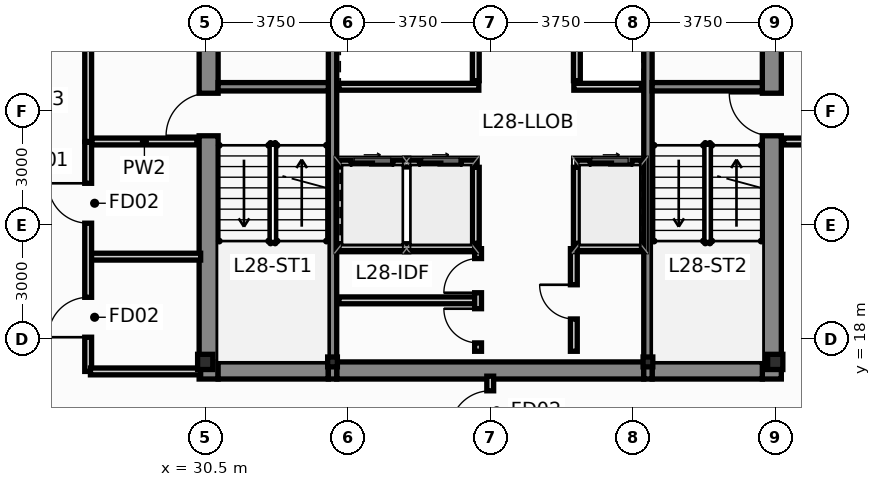
"""IFC4 building model, lengths in metres.
Left out: names, types, materials, properties, quantities, classifications, styles, units other than length and angle.
Written with IfcOpenShell. Run it as: python <this file> out.ifc"""

import sys

from ifc_helpers import new_model, si_unit, direction, frame, frame_2d, origin, origin_2d, place, context, subcontext, project, spatial, rectangle, i_section, extrude, source, transform, mapped, element, fill, save


model = new_model("IFC4")
c1 = context("Model", 3, precision=1e-05, world=origin(), true_north=direction((0.0, 1.0)))
c2 = subcontext(c1, "Body", "Model", "MODEL_VIEW")
j1 = project(units=[si_unit("LENGTHUNIT", "METRE"), si_unit("PLANEANGLEUNIT", "RADIAN")], contexts=[c1])
p1 = place(None, origin())
s1 = spatial("IfcSite", under=j1, at=p1, CompositionType="ELEMENT")
p2 = place(p1, origin())
s2 = spatial("IfcBuilding", under=s1, at=p2, CompositionType="ELEMENT")
p3 = place(p2, frame((0.0, 0.0, 109.05)))
s3 = spatial("IfcBuildingStorey", under=s2, at=p3, CompositionType="ELEMENT", Elevation=109.05)
m1 = source(origin(), c2, "Body", "SweptSolid", [
    extrude(i_section(OverallWidth=0.4, OverallDepth=0.4, WebThickness=0.02, FlangeThickness=0.032, at=origin_2d()), origin(), (0.0, 0.0, 1.0), 3.65),
])
for number, where, z_axis, x_axis in (
    (1, (30.5, 17.4, 0.0), (0.0, 0.0, 1.0), (1.0, 0.0, 0.0)),
    (2, (45.5, 17.4, 0.0), (0.0, 0.0, 1.0), (1.0, 0.0, 0.0)),
):
    element("IfcColumn", number, at=place(p3, frame(where, z_axis=z_axis, x_axis=x_axis)), inside=s3, PredefinedType="COLUMN", context=c2, shape_type="MappedRepresentation", body=[
        mapped(m1, transform((0.0, 0.0, 0.0), scale=1.0)),
    ])
m2 = source(origin(), c2, "Body", "SweptSolid", [
    extrude(i_section(OverallWidth=0.256, OverallDepth=0.26, WebThickness=0.01, FlangeThickness=0.017, at=origin_2d()), origin(), (0.0, 0.0, 1.0), 3.65),
])
for number, where, z_axis, x_axis in (
    (3, (33.85, 17.4, 0.0), (0.0, 0.0, 1.0), (1.0, 0.0, 0.0)),
    (4, (42.15, 17.4, 0.0), (0.0, 0.0, 1.0), (1.0, 0.0, 0.0)),
):
    element("IfcColumn", number, at=place(p3, frame(where, z_axis=z_axis, x_axis=x_axis)), inside=s3, PredefinedType="COLUMN", context=c2, shape_type="MappedRepresentation", body=[
        mapped(m2, transform((0.0, 0.0, 0.0), scale=1.0)),
    ])
p4 = place(p3, frame((30.59, 16.95, 0.0), z_axis=(0.0, 0.0, 1.0), x_axis=(0.0, 1.0, 0.0)))
e5 = element("IfcWall", 5, at=p4, inside=s3, PredefinedType="SHEAR", context=c2, shape_type="SweptSolid", body=[
    extrude(rectangle(XDim=13.275, YDim=0.5, at=frame_2d((6.638, 0.0))), origin(), (0.0, 0.0, 1.0), 3.65),
])
p5 = place(p4, frame((6.4, 0.0, 0.0)))
e6 = element("IfcOpeningElement", 6, at=p5, cuts=e5, PredefinedType="OPENING", context=c2, shape_type="SweptSolid", body=[
    extrude(rectangle(XDim=1.12, YDim=2.15, at=frame_2d((0.56, 1.075))), frame((0.0, 0.262, 0.0), z_axis=(0.0, -1.0, 0.0), x_axis=(1.0, 0.0, 0.0)), (0.0, 0.0, 1.0), 0.524),
])
p6 = place(p4, frame((10.85, 0.0, 0.0)))
e7 = element("IfcOpeningElement", 7, at=p6, cuts=e5, PredefinedType="OPENING", context=c2, shape_type="SweptSolid", body=[
    extrude(rectangle(XDim=1.2, YDim=2.2, at=frame_2d((0.6, 1.1))), frame((0.0, 0.262, 0.0), z_axis=(0.0, -1.0, 0.0), x_axis=(1.0, 0.0, 0.0)), (0.0, 0.0, 1.0), 0.524),
])
p7 = place(p3, frame((45.41, 16.95, 0.0), z_axis=(0.0, 0.0, 1.0), x_axis=(0.0, 1.0, 0.0)))
e8 = element("IfcWall", 8, at=p7, inside=s3, PredefinedType="SHEAR", context=c2, shape_type="SweptSolid", body=[
    extrude(rectangle(XDim=13.275, YDim=0.5, at=frame_2d((6.638, 0.0))), origin(), (0.0, 0.0, 1.0), 3.65),
])
p8 = place(p7, frame((6.4, 0.0, 0.0)))
e9 = element("IfcOpeningElement", 9, at=p8, cuts=e8, PredefinedType="OPENING", context=c2, shape_type="SweptSolid", body=[
    extrude(rectangle(XDim=1.12, YDim=2.15, at=frame_2d((0.56, 1.075))), frame((0.0, 0.262, 0.0), z_axis=(0.0, -1.0, 0.0), x_axis=(1.0, 0.0, 0.0)), (0.0, 0.0, 1.0), 0.524),
])
p9 = place(p7, frame((10.85, 0.0, 0.0)))
e10 = element("IfcOpeningElement", 10, at=p9, cuts=e8, PredefinedType="OPENING", context=c2, shape_type="SweptSolid", body=[
    extrude(rectangle(XDim=1.2, YDim=2.2, at=frame_2d((0.6, 1.1))), frame((0.0, 0.262, 0.0), z_axis=(0.0, -1.0, 0.0), x_axis=(1.0, 0.0, 0.0)), (0.0, 0.0, 1.0), 0.524),
])
p10 = place(p3, frame((30.84, 17.175, 0.0), z_axis=(0.0, 0.0, 1.0), x_axis=(1.0, 0.0, 0.0)))
e11 = element("IfcWall", 11, at=p10, inside=s3, PredefinedType="SHEAR", context=c2, shape_type="SweptSolid", body=[
    extrude(rectangle(XDim=2.9, YDim=0.45, at=frame_2d((1.45, 0.0))), origin(), (0.0, 0.0, 1.0), 3.65),
])
p11 = place(p3, frame((33.96, 17.175, 0.0), z_axis=(0.0, 0.0, 1.0), x_axis=(1.0, 0.0, 0.0)))
e12 = element("IfcWall", 12, at=p11, inside=s3, PredefinedType="SHEAR", context=c2, shape_type="SweptSolid", body=[
    extrude(rectangle(XDim=8.08, YDim=0.45, at=frame_2d((4.04, 0.0))), origin(), (0.0, 0.0, 1.0), 3.65),
])
p12 = place(p3, frame((42.26, 17.175, 0.0), z_axis=(0.0, 0.0, 1.0), x_axis=(1.0, 0.0, 0.0)))
e13 = element("IfcWall", 13, at=p12, inside=s3, PredefinedType="SHEAR", context=c2, shape_type="SweptSolid", body=[
    extrude(rectangle(XDim=2.9, YDim=0.45, at=frame_2d((1.45, 0.0))), origin(), (0.0, 0.0, 1.0), 3.65),
])
for number, where, z_axis, x_axis in (
    (14, (33.85, 16.95, 0.0), (0.0, 0.0, 1.0), (0.0, 1.0, 0.0)),
    (15, (42.15, 16.95, 0.0), (0.0, 0.0, 1.0), (0.0, 1.0, 0.0)),
):
    element("IfcWall", number, at=place(p3, frame(where, z_axis=z_axis, x_axis=x_axis)), inside=s3, PredefinedType="SHEAR", context=c2, shape_type="SweptSolid", body=[
        extrude(rectangle(XDim=13.275, YDim=0.22, at=frame_2d((6.638, 0.0))), origin(), (0.0, 0.0, 1.0), 3.65),
    ])
for number, where, z_axis, x_axis in (
    (16, (30.84, 24.64, 0.0), (0.0, 0.0, 1.0), (1.0, 0.0, 0.0)),
    (17, (42.26, 24.64, 0.0), (0.0, 0.0, 1.0), (1.0, 0.0, 0.0)),
):
    element("IfcWall", number, at=place(p3, frame(where, z_axis=z_axis, x_axis=x_axis)), inside=s3, PredefinedType="SHEAR", context=c2, shape_type="SweptSolid", body=[
        extrude(rectangle(XDim=2.9, YDim=0.22, at=frame_2d((1.45, 0.0))), origin(), (0.0, 0.0, 1.0), 3.65),
    ])
p13 = place(p3, frame((34.02, 22.62, 0.0), z_axis=(0.0, 0.0, 1.0), x_axis=(1.0, 0.0, 0.0)))
e18 = element("IfcWall", 18, at=p13, inside=s3, PredefinedType="PARTITIONING", context=c2, shape_type="SweptSolid", body=[
    extrude(rectangle(XDim=3.6, YDim=0.18, at=frame_2d((1.8, 0.0))), origin(), (0.0, 0.0, 1.0), 3.4),
])
p14 = place(p13, frame((0.32, 0.0, 0.0)))
e19 = element("IfcOpeningElement", 19, at=p14, cuts=e18, PredefinedType="OPENING", context=c2, shape_type="SweptSolid", body=[
    extrude(rectangle(XDim=1.1, YDim=2.2, at=frame_2d((0.55, 1.1))), frame((0.0, 0.102, 0.0), z_axis=(0.0, -1.0, 0.0), x_axis=(1.0, 0.0, 0.0)), (0.0, 0.0, 1.0), 0.204),
])
p15 = place(p13, frame((2.12, 0.0, 0.0)))
e20 = element("IfcOpeningElement", 20, at=p15, cuts=e18, PredefinedType="OPENING", context=c2, shape_type="SweptSolid", body=[
    extrude(rectangle(XDim=1.1, YDim=2.2, at=frame_2d((0.55, 1.1))), frame((0.0, 0.102, 0.0), z_axis=(0.0, -1.0, 0.0), x_axis=(1.0, 0.0, 0.0)), (0.0, 0.0, 1.0), 0.204),
])
p16 = place(p3, frame((40.28, 22.62, 0.0), z_axis=(0.0, 0.0, 1.0), x_axis=(1.0, 0.0, 0.0)))
e21 = element("IfcWall", 21, at=p16, inside=s3, PredefinedType="PARTITIONING", context=c2, shape_type="SweptSolid", body=[
    extrude(rectangle(XDim=1.7, YDim=0.18, at=frame_2d((0.85, 0.0))), origin(), (0.0, 0.0, 1.0), 3.4),
])
p17 = place(p16, frame((0.35, 0.0, 0.0)))
e22 = element("IfcOpeningElement", 22, at=p17, cuts=e21, PredefinedType="OPENING", context=c2, shape_type="SweptSolid", body=[
    extrude(rectangle(XDim=1.1, YDim=2.2, at=frame_2d((0.55, 1.1))), frame((0.0, 0.102, 0.0), z_axis=(0.0, -1.0, 0.0), x_axis=(1.0, 0.0, 0.0)), (0.0, 0.0, 1.0), 0.204),
])
for number, where, z_axis, x_axis in (
    (23, (37.62, 20.52, 0.0), (0.0, 0.0, 1.0), (0.0, 1.0, 0.0)),
    (24, (40.28, 20.52, 0.0), (0.0, 0.0, 1.0), (0.0, 1.0, 0.0)),
    (25, (37.62, 24.8, 0.0), (0.0, 0.0, 1.0), (0.0, 1.0, 0.0)),
    (26, (40.28, 24.8, 0.0), (0.0, 0.0, 1.0), (0.0, 1.0, 0.0)),
):
    element("IfcWall", number, at=place(p3, frame(where, z_axis=z_axis, x_axis=x_axis)), inside=s3, PredefinedType="PARTITIONING", context=c2, shape_type="SweptSolid", body=[
        extrude(rectangle(XDim=2.0, YDim=0.18, at=frame_2d((1.0, 0.0))), origin(), (0.0, 0.0, 1.0), 3.4),
    ])
p18 = place(p3, frame((34.02, 24.64, 0.0), z_axis=(0.0, 0.0, 1.0), x_axis=(1.0, 0.0, 0.0)))
e27 = element("IfcWall", 27, at=p18, inside=s3, PredefinedType="PARTITIONING", context=c2, shape_type="SweptSolid", body=[
    extrude(rectangle(XDim=3.68, YDim=0.18, at=frame_2d((1.84, 0.0))), origin(), (0.0, 0.0, 1.0), 3.4),
])
p19 = place(p3, frame((40.2, 24.64, 0.0), z_axis=(0.0, 0.0, 1.0), x_axis=(1.0, 0.0, 0.0)))
e28 = element("IfcWall", 28, at=p19, inside=s3, PredefinedType="PARTITIONING", context=c2, shape_type="SweptSolid", body=[
    extrude(rectangle(XDim=1.78, YDim=0.18, at=frame_2d((0.89, 0.0))), origin(), (0.0, 0.0, 1.0), 3.4),
])
p20 = place(p3, frame((27.42, 23.2, 0.0), z_axis=(0.0, 0.0, 1.0), x_axis=(0.0, 1.0, 0.0)))
e29 = element("IfcWall", 29, at=p20, inside=s3, PredefinedType="PARTITIONING", context=c2, shape_type="SweptSolid", body=[
    extrude(rectangle(XDim=6.4, YDim=0.18, at=frame_2d((3.2, 0.0))), origin(), (0.0, 0.0, 1.0), 3.026),
])
p21 = place(p20, frame((2.65, 0.0, 0.0)))
e30 = element("IfcOpeningElement", 30, at=p21, cuts=e29, PredefinedType="OPENING", context=c2, shape_type="SweptSolid", body=[
    extrude(rectangle(XDim=1.05, YDim=2.15, at=frame_2d((0.525, 1.075))), frame((0.0, 0.102, 0.0), z_axis=(0.0, -1.0, 0.0), x_axis=(1.0, 0.0, 0.0)), (0.0, 0.0, 1.0), 0.204),
])
for number, where, z_axis, x_axis in (
    (31, (27.52, 23.2, 0.0), (0.0, 0.0, 1.0), (1.0, 0.0, 0.0)),
    (32, (45.72, 23.2, 0.0), (0.0, 0.0, 1.0), (1.0, 0.0, 0.0)),
):
    element("IfcWall", number, at=place(p3, frame(where, z_axis=z_axis, x_axis=x_axis)), inside=s3, PredefinedType="PARTITIONING", context=c2, shape_type="SweptSolid", body=[
        extrude(rectangle(XDim=2.76, YDim=0.18, at=frame_2d((1.38, 0.0))), origin(), (0.0, 0.0, 1.0), 3.4),
    ])
p22 = place(p3, frame((34.02, 20.42, 0.0), z_axis=(0.0, 0.0, 1.0), x_axis=(1.0, 0.0, 0.0)))
e33 = element("IfcWall", 33, at=p22, inside=s3, PredefinedType="PARTITIONING", context=c2, shape_type="SweptSolid", body=[
    extrude(rectangle(XDim=3.64, YDim=0.18, at=frame_2d((1.82, 0.0))), origin(), (0.0, 0.0, 1.0), 3.4),
])
p23 = place(p3, frame((40.22, 20.42, 0.0), z_axis=(0.0, 0.0, 1.0), x_axis=(1.0, 0.0, 0.0)))
e34 = element("IfcWall", 34, at=p23, inside=s3, PredefinedType="PARTITIONING", context=c2, shape_type="SweptSolid", body=[
    extrude(rectangle(XDim=1.76, YDim=0.18, at=frame_2d((0.88, 0.0))), origin(), (0.0, 0.0, 1.0), 3.4),
])
p24 = place(p3, frame((34.02, 19.02, 0.0), z_axis=(0.0, 0.0, 1.0), x_axis=(1.0, 0.0, 0.0)))
e35 = element("IfcWall", 35, at=p24, inside=s3, PredefinedType="PARTITIONING", context=c2, shape_type="SweptSolid", body=[
    extrude(rectangle(XDim=3.58, YDim=0.18, at=frame_2d((1.79, 0.0))), origin(), (0.0, 0.0, 1.0), 3.4),
])
p25 = place(p3, frame((37.68, 17.68, 0.0), z_axis=(0.0, 0.0, 1.0), x_axis=(0.0, 1.0, 0.0)))
e36 = element("IfcWall", 36, at=p25, inside=s3, PredefinedType="PARTITIONING", context=c2, shape_type="SweptSolid", body=[
    extrude(rectangle(XDim=2.7, YDim=0.18, at=frame_2d((1.35, 0.0))), origin(), (0.0, 0.0, 1.0), 3.4),
])
p26 = place(p25, frame((0.22, 0.0, 0.0)))
e37 = element("IfcOpeningElement", 37, at=p26, cuts=e36, PredefinedType="OPENING", context=c2, shape_type="SweptSolid", body=[
    extrude(rectangle(XDim=0.9, YDim=2.1, at=frame_2d((0.45, 1.05))), frame((0.0, 0.102, 0.0), z_axis=(0.0, -1.0, 0.0), x_axis=(1.0, 0.0, 0.0)), (0.0, 0.0, 1.0), 0.204),
])
p27 = place(p25, frame((1.54, 0.0, 0.0)))
e38 = element("IfcOpeningElement", 38, at=p27, cuts=e36, PredefinedType="OPENING", context=c2, shape_type="SweptSolid", body=[
    extrude(rectangle(XDim=0.9, YDim=2.1, at=frame_2d((0.45, 1.05))), frame((0.0, 0.102, 0.0), z_axis=(0.0, -1.0, 0.0), x_axis=(1.0, 0.0, 0.0)), (0.0, 0.0, 1.0), 0.204),
])
p28 = place(p3, frame((40.2, 17.68, 0.0), z_axis=(0.0, 0.0, 1.0), x_axis=(0.0, 1.0, 0.0)))
e39 = element("IfcWall", 39, at=p28, inside=s3, PredefinedType="PARTITIONING", context=c2, shape_type="SweptSolid", body=[
    extrude(rectangle(XDim=2.7, YDim=0.18, at=frame_2d((1.35, 0.0))), origin(), (0.0, 0.0, 1.0), 3.4),
])
p29 = place(p28, frame((0.85, 0.0, 0.0)))
e40 = element("IfcOpeningElement", 40, at=p29, cuts=e39, PredefinedType="OPENING", context=c2, shape_type="SweptSolid", body=[
    extrude(rectangle(XDim=0.9, YDim=2.1, at=frame_2d((0.45, 1.05))), frame((0.0, 0.102, 0.0), z_axis=(0.0, -1.0, 0.0), x_axis=(1.0, 0.0, 0.0)), (0.0, 0.0, 1.0), 0.204),
])
p30 = place(p3, frame((27.48, 20.17, 0.0), z_axis=(0.0, 0.0, 1.0), x_axis=(1.0, 0.0, 0.0)))
e41 = element("IfcWall", 41, at=p30, inside=s3, PredefinedType="PARTITIONING", context=c2, shape_type="SweptSolid", body=[
    extrude(rectangle(XDim=2.9, YDim=0.18, at=frame_2d((1.45, 0.0))), origin(), (0.0, 0.0, 1.0), 3.4),
])
p31 = place(p3, frame((27.42, 17.15, 0.0), z_axis=(0.0, 0.0, 1.0), x_axis=(0.0, 1.0, 0.0)))
e42 = element("IfcWall", 42, at=p31, inside=s3, PredefinedType="PARTITIONING", context=c2, shape_type="SweptSolid", body=[
    extrude(rectangle(XDim=6.03, YDim=0.18, at=frame_2d((3.015, 0.0))), origin(), (0.0, 0.0, 1.0), 3.026),
])
p32 = place(p31, frame((0.9, 0.0, 0.0)))
e43 = element("IfcOpeningElement", 43, at=p32, cuts=e42, PredefinedType="OPENING", context=c2, shape_type="SweptSolid", body=[
    extrude(rectangle(XDim=1.05, YDim=2.15, at=frame_2d((0.525, 1.075))), frame((0.0, 0.102, 0.0), z_axis=(0.0, -1.0, 0.0), x_axis=(1.0, 0.0, 0.0)), (0.0, 0.0, 1.0), 0.204),
])
p33 = place(p31, frame((3.9, 0.0, 0.0)))
e44 = element("IfcOpeningElement", 44, at=p33, cuts=e42, PredefinedType="OPENING", context=c2, shape_type="SweptSolid", body=[
    extrude(rectangle(XDim=1.05, YDim=2.15, at=frame_2d((0.525, 1.075))), frame((0.0, 0.102, 0.0), z_axis=(0.0, -1.0, 0.0), x_axis=(1.0, 0.0, 0.0)), (0.0, 0.0, 1.0), 0.204),
])
p34 = place(p3, frame((27.48, 17.15, 0.0), z_axis=(0.0, 0.0, 1.0), x_axis=(1.0, 0.0, 0.0)))
e45 = element("IfcWall", 45, at=p34, inside=s3, PredefinedType="PARTITIONING", context=c2, shape_type="SweptSolid", body=[
    extrude(rectangle(XDim=2.9, YDim=0.18, at=frame_2d((1.45, 0.0))), origin(), (0.0, 0.0, 1.0), 2.783),
])
p35 = place(p3, frame((38.0, 15.205, 0.0), z_axis=(0.0, 0.0, 1.0), x_axis=(0.0, 1.0, 0.0)))
e46 = element("IfcWall", 46, at=p35, inside=s3, PredefinedType="PARTITIONING", context=c2, shape_type="SweptSolid", body=[
    extrude(rectangle(XDim=1.82, YDim=0.18, at=frame_2d((0.91, 0.0))), origin(), (0.0, 0.0, 1.0), 3.4),
])
p36 = place(p35, frame((0.385, 0.0, 0.0)))
e47 = element("IfcOpeningElement", 47, at=p36, cuts=e46, PredefinedType="OPENING", context=c2, shape_type="SweptSolid", body=[
    extrude(rectangle(XDim=1.05, YDim=2.15, at=frame_2d((0.525, 1.075))), frame((0.0, 0.102, 0.0), z_axis=(0.0, -1.0, 0.0), x_axis=(1.0, 0.0, 0.0)), (0.0, 0.0, 1.0), 0.204),
])
p37 = place(p5, origin())
e48 = element("IfcDoor", 48, at=p37, inside=s3, OperationType="SINGLE_SWING_LEFT", PredefinedType="DOOR", context=c2, shape_type="SweptSolid", body=[
    extrude(rectangle(XDim=1.12, YDim=2.15, at=frame_2d((0.56, 1.075))), frame((0.0, 0.025, 0.0), z_axis=(0.0, -1.0, 0.0), x_axis=(1.0, 0.0, 0.0)), (0.0, 0.0, 1.0), 0.05),
])
fill(e6, e48)
p38 = place(p8, origin())
e49 = element("IfcDoor", 49, at=p38, inside=s3, OperationType="SINGLE_SWING_RIGHT", PredefinedType="DOOR", context=c2, shape_type="SweptSolid", body=[
    extrude(rectangle(XDim=1.12, YDim=2.15, at=frame_2d((0.56, 1.075))), frame((0.0, 0.025, 0.0), z_axis=(0.0, -1.0, 0.0), x_axis=(1.0, 0.0, 0.0)), (0.0, 0.0, 1.0), 0.05),
])
fill(e9, e49)
p39 = place(p14, origin())
e50 = element("IfcDoor", 50, at=p39, inside=s3, OperationType="SLIDING_TO_LEFT", PredefinedType="DOOR", context=c2, shape_type="SweptSolid", body=[
    extrude(rectangle(XDim=1.1, YDim=2.2, at=frame_2d((0.55, 1.1))), frame((0.0, 0.025, 0.0), z_axis=(0.0, -1.0, 0.0), x_axis=(1.0, 0.0, 0.0)), (0.0, 0.0, 1.0), 0.05),
])
fill(e19, e50)
p40 = place(p15, origin())
e51 = element("IfcDoor", 51, at=p40, inside=s3, OperationType="SLIDING_TO_RIGHT", PredefinedType="DOOR", context=c2, shape_type="SweptSolid", body=[
    extrude(rectangle(XDim=1.1, YDim=2.2, at=frame_2d((0.55, 1.1))), frame((0.0, 0.025, 0.0), z_axis=(0.0, -1.0, 0.0), x_axis=(1.0, 0.0, 0.0)), (0.0, 0.0, 1.0), 0.05),
])
fill(e20, e51)
p41 = place(p17, origin())
e52 = element("IfcDoor", 52, at=p41, inside=s3, OperationType="SLIDING_TO_LEFT", PredefinedType="DOOR", context=c2, shape_type="SweptSolid", body=[
    extrude(rectangle(XDim=1.1, YDim=2.2, at=frame_2d((0.55, 1.1))), frame((0.0, 0.025, 0.0), z_axis=(0.0, -1.0, 0.0), x_axis=(1.0, 0.0, 0.0)), (0.0, 0.0, 1.0), 0.05),
])
fill(e22, e52)
p42 = place(p26, origin())
e53 = element("IfcDoor", 53, at=p42, inside=s3, OperationType="SINGLE_SWING_RIGHT", PredefinedType="DOOR", context=c2, shape_type="SweptSolid", body=[
    extrude(rectangle(XDim=0.9, YDim=2.1, at=frame_2d((0.45, 1.05))), frame((0.0, 0.025, 0.0), z_axis=(0.0, -1.0, 0.0), x_axis=(1.0, 0.0, 0.0)), (0.0, 0.0, 1.0), 0.05),
])
fill(e37, e53)
p43 = place(p27, origin())
e54 = element("IfcDoor", 54, at=p43, inside=s3, OperationType="SINGLE_SWING_LEFT", PredefinedType="DOOR", context=c2, shape_type="SweptSolid", body=[
    extrude(rectangle(XDim=0.9, YDim=2.1, at=frame_2d((0.45, 1.05))), frame((0.0, 0.025, 0.0), z_axis=(0.0, -1.0, 0.0), x_axis=(1.0, 0.0, 0.0)), (0.0, 0.0, 1.0), 0.05),
])
fill(e38, e54)
p44 = place(p29, origin())
e55 = element("IfcDoor", 55, at=p44, inside=s3, OperationType="SINGLE_SWING_RIGHT", PredefinedType="DOOR", context=c2, shape_type="SweptSolid", body=[
    extrude(rectangle(XDim=0.9, YDim=2.1, at=frame_2d((0.45, 1.05))), frame((0.0, 0.025, 0.0), z_axis=(0.0, -1.0, 0.0), x_axis=(1.0, 0.0, 0.0)), (0.0, 0.0, 1.0), 0.05),
])
fill(e40, e55)
p45 = place(p32, origin())
e56 = element("IfcDoor", 56, at=p45, inside=s3, OperationType="SINGLE_SWING_LEFT", PredefinedType="DOOR", context=c2, shape_type="SweptSolid", body=[
    extrude(rectangle(XDim=1.05, YDim=2.15, at=frame_2d((0.525, 1.075))), frame((0.0, 0.025, 0.0), z_axis=(0.0, -1.0, 0.0), x_axis=(1.0, 0.0, 0.0)), (0.0, 0.0, 1.0), 0.05),
])
fill(e43, e56)
p46 = place(p33, origin())
e57 = element("IfcDoor", 57, at=p46, inside=s3, OperationType="SINGLE_SWING_RIGHT", PredefinedType="DOOR", context=c2, shape_type="SweptSolid", body=[
    extrude(rectangle(XDim=1.05, YDim=2.15, at=frame_2d((0.525, 1.075))), frame((0.0, 0.025, 0.0), z_axis=(0.0, -1.0, 0.0), x_axis=(1.0, 0.0, 0.0)), (0.0, 0.0, 1.0), 0.05),
])
fill(e44, e57)
p47 = place(p36, origin())
e58 = element("IfcDoor", 58, at=p47, inside=s3, OperationType="SINGLE_SWING_LEFT", PredefinedType="DOOR", context=c2, shape_type="SweptSolid", body=[
    extrude(rectangle(XDim=1.05, YDim=2.15, at=frame_2d((0.525, 1.075))), frame((0.0, 0.025, 0.0), z_axis=(0.0, -1.0, 0.0), x_axis=(1.0, 0.0, 0.0)), (0.0, 0.0, 1.0), 0.05),
])
fill(e47, e58)
save(model, sys.argv[1])
